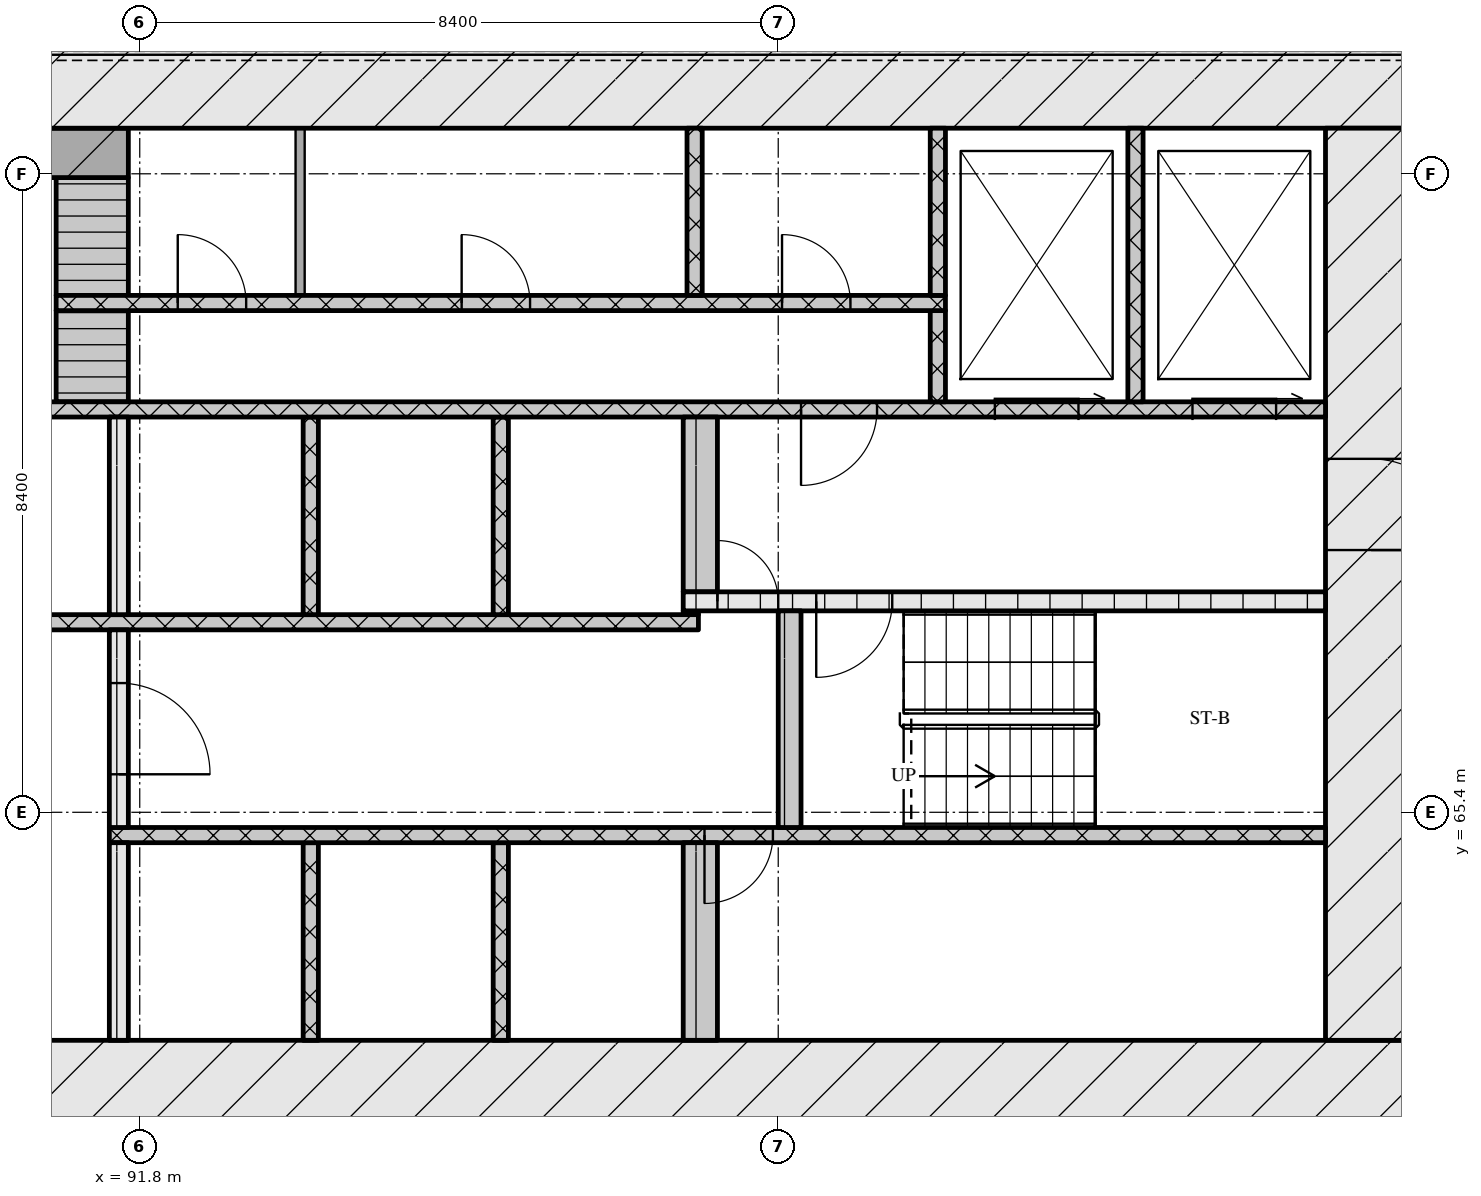
"""IFC4 building model, lengths in metres.
Left out: names, types, materials, properties, quantities, classifications, styles, units other than length and angle.
Written with IfcOpenShell. Run it as: python <this file> out.ifc"""

import sys

from ifc_helpers import new_model, si_unit, direction, frame, frame_2d, origin, place, context, subcontext, project, spatial, rectangle, extrude, element, fill, save


model = new_model("IFC4")
c1 = context("Model", 3, precision=1e-05, world=origin(), true_north=direction((0.0, 1.0)))
c2 = subcontext(c1, "Body", "Model", "MODEL_VIEW")
j1 = project(units=[si_unit("LENGTHUNIT", "METRE"), si_unit("PLANEANGLEUNIT", "RADIAN")], contexts=[c1])
p1 = place(None, origin())
s1 = spatial("IfcSite", under=j1, at=p1, CompositionType="ELEMENT")
p2 = place(p1, origin())
s2 = spatial("IfcBuilding", under=s1, at=p2, CompositionType="ELEMENT")
p3 = place(p2, frame((0.0, 0.0, 55.2)))
s3 = spatial("IfcBuildingStorey", under=s2, at=p3, CompositionType="ELEMENT", Elevation=55.2)
p4 = place(p3, frame((66.6, 61.8, 0.0), z_axis=(0.0, 0.0, 1.0), x_axis=(1.0, 0.0, 0.0)))
e1 = element("IfcWall", 1, at=p4, inside=s3, PredefinedType="SOLIDWALL", context=c2, shape_type="SweptSolid", body=[
    extrude(rectangle(XDim=42.0, YDim=1.2, at=frame_2d((21.0, 0.0))), origin(), (0.0, 0.0, 1.0), 3.32),
])
p5 = place(p4, frame((21.35, 0.0, 0.0)))
e2 = element("IfcOpeningElement", 2, at=p5, cuts=e1, PredefinedType="OPENING", context=c2, shape_type="SweptSolid", body=[
    extrude(rectangle(XDim=1.8, YDim=2.1, at=frame_2d((0.9, 1.05))), frame((0.0, 0.61, 0.0), z_axis=(0.0, -1.0, 0.0), x_axis=(1.0, 0.0, 0.0)), (0.0, 0.0, 1.0), 1.22),
])
p6 = place(p3, frame((66.6, 75.0, 0.0), z_axis=(0.0, 0.0, 1.0), x_axis=(1.0, 0.0, 0.0)))
e3 = element("IfcWall", 3, at=p6, inside=s3, PredefinedType="SOLIDWALL", context=c2, shape_type="SweptSolid", body=[
    extrude(rectangle(XDim=42.0, YDim=1.2, at=frame_2d((21.0, 0.0))), origin(), (0.0, 0.0, 1.0), 3.32),
])
p7 = place(p3, frame((108.0, 62.4, 0.0), z_axis=(0.0, 0.0, 1.0), x_axis=(0.0, 1.0, 0.0)))
e4 = element("IfcWall", 4, at=p7, inside=s3, PredefinedType="SOLIDWALL", context=c2, shape_type="SweptSolid", body=[
    extrude(rectangle(XDim=12.0, YDim=1.2, at=frame_2d((6.0, 0.0))), origin(), (0.0, 0.0, 1.0), 3.32),
])
p8 = place(p7, frame((6.45, 0.0, 0.0)))
e5 = element("IfcOpeningElement", 5, at=p8, cuts=e4, PredefinedType="OPENING", context=c2, shape_type="SweptSolid", body=[
    extrude(rectangle(XDim=1.2, YDim=2.1, at=frame_2d((0.6, 1.05))), frame((0.0, 0.61, 0.0), z_axis=(0.0, -1.0, 0.0), x_axis=(1.0, 0.0, 0.0)), (0.0, 0.0, 1.0), 1.22),
])
p9 = place(p3, frame((91.525, 62.4, 0.0), z_axis=(0.0, 0.0, 1.0), x_axis=(0.0, 1.0, 0.0)))
e6 = element("IfcWall", 6, at=p9, inside=s3, PredefinedType="SOLIDWALL", context=c2, shape_type="SweptSolid", body=[
    extrude(rectangle(XDim=2.6, YDim=0.25, at=frame_2d((1.3, 0.0))), origin(), (0.0, 0.0, 1.0), 3.32),
])
for number, where, z_axis, x_axis in (
    (7, (94.05, 62.4, 0.0), (0.0, 0.0, 1.0), (0.0, 1.0, 0.0)),
    (8, (96.55, 62.4, 0.0), (0.0, 0.0, 1.0), (0.0, 1.0, 0.0)),
):
    element("IfcWall", number, at=place(p3, frame(where, z_axis=z_axis, x_axis=x_axis)), inside=s3, PredefinedType="SOLIDWALL", context=c2, shape_type="SweptSolid", body=[
        extrude(rectangle(XDim=2.6, YDim=0.2, at=frame_2d((1.3, 0.0))), origin(), (0.0, 0.0, 1.0), 3.32),
    ])
p10 = place(p3, frame((99.175, 62.4, 0.0), z_axis=(0.0, 0.0, 1.0), x_axis=(0.0, 1.0, 0.0)))
e9 = element("IfcWall", 9, at=p10, inside=s3, PredefinedType="SOLIDWALL", context=c2, shape_type="SweptSolid", body=[
    extrude(rectangle(XDim=2.6, YDim=0.45, at=frame_2d((1.3, 0.0))), origin(), (0.0, 0.0, 1.0), 3.32),
])
p11 = place(p3, frame((91.4, 65.1, 0.0), z_axis=(0.0, 0.0, 1.0), x_axis=(1.0, 0.0, 0.0)))
e10 = element("IfcWall", 10, at=p11, inside=s3, PredefinedType="SOLIDWALL", context=c2, shape_type="SweptSolid", body=[
    extrude(rectangle(XDim=16.0, YDim=0.2, at=frame_2d((8.0, 0.0))), origin(), (0.0, 0.0, 1.0), 3.32),
])
p12 = place(p11, frame((7.83, 0.0, 0.0)))
e11 = element("IfcOpeningElement", 11, at=p12, cuts=e10, PredefinedType="OPENING", context=c2, shape_type="SweptSolid", body=[
    extrude(rectangle(XDim=0.9, YDim=2.1, at=frame_2d((0.45, 1.05))), frame((0.0, 0.11, 0.0), z_axis=(0.0, -1.0, 0.0), x_axis=(1.0, 0.0, 0.0)), (0.0, 0.0, 1.0), 0.22),
])
p13 = place(p3, frame((91.525, 65.2, 0.0), z_axis=(0.0, 0.0, 1.0), x_axis=(0.0, 1.0, 0.0)))
e12 = element("IfcWall", 12, at=p13, inside=s3, PredefinedType="SOLIDWALL", context=c2, shape_type="SweptSolid", body=[
    extrude(rectangle(XDim=2.6, YDim=0.25, at=frame_2d((1.3, 0.0))), origin(), (0.0, 0.0, 1.0), 3.32),
])
p14 = place(p13, frame((0.7, 0.0, 0.0)))
e13 = element("IfcOpeningElement", 13, at=p14, cuts=e12, PredefinedType="OPENING", context=c2, shape_type="SweptSolid", body=[
    extrude(rectangle(XDim=1.2, YDim=2.1, at=frame_2d((0.6, 1.05))), frame((0.0, 0.135, 0.0), z_axis=(0.0, -1.0, 0.0), x_axis=(1.0, 0.0, 0.0)), (0.0, 0.0, 1.0), 0.27),
])
p15 = place(p3, frame((100.35, 65.2, 0.0), z_axis=(0.0, 0.0, 1.0), x_axis=(0.0, 1.0, 0.0)))
e14 = element("IfcWall", 14, at=p15, inside=s3, PredefinedType="SOLIDWALL", context=c2, shape_type="SweptSolid", body=[
    extrude(rectangle(XDim=2.85, YDim=0.3, at=frame_2d((1.425, 0.0))), origin(), (0.0, 0.0, 1.0), 3.32),
])
p16 = place(p3, frame((76.05, 67.9, 0.0), z_axis=(0.0, 0.0, 1.0), x_axis=(1.0, 0.0, 0.0)))
e15 = element("IfcWall", 15, at=p16, inside=s3, PredefinedType="SOLIDWALL", context=c2, shape_type="SweptSolid", body=[
    extrude(rectangle(XDim=23.1, YDim=0.2, at=frame_2d((11.55, 0.0))), origin(), (0.0, 0.0, 1.0), 3.32),
])
p17 = place(p16, frame((0.6, 0.0, 0.0)))
e16 = element("IfcOpeningElement", 16, at=p17, cuts=e15, PredefinedType="OPENING", context=c2, shape_type="SweptSolid", body=[
    extrude(rectangle(XDim=1.1, YDim=2.1, at=frame_2d((0.55, 1.05))), frame((0.0, 0.11, 0.0), z_axis=(0.0, -1.0, 0.0), x_axis=(1.0, 0.0, 0.0)), (0.0, 0.0, 1.0), 0.22),
])
p18 = place(p16, frame((3.1, 0.0, 0.0)))
e17 = element("IfcOpeningElement", 17, at=p18, cuts=e15, PredefinedType="OPENING", context=c2, shape_type="SweptSolid", body=[
    extrude(rectangle(XDim=1.1, YDim=2.1, at=frame_2d((0.55, 1.05))), frame((0.0, 0.11, 0.0), z_axis=(0.0, -1.0, 0.0), x_axis=(1.0, 0.0, 0.0)), (0.0, 0.0, 1.0), 0.22),
])
p19 = place(p16, frame((5.6, 0.0, 0.0)))
e18 = element("IfcOpeningElement", 18, at=p19, cuts=e15, PredefinedType="OPENING", context=c2, shape_type="SweptSolid", body=[
    extrude(rectangle(XDim=1.1, YDim=2.1, at=frame_2d((0.55, 1.05))), frame((0.0, 0.11, 0.0), z_axis=(0.0, -1.0, 0.0), x_axis=(1.0, 0.0, 0.0)), (0.0, 0.0, 1.0), 0.22),
])
p20 = place(p16, frame((9.7, 0.0, 0.0)))
e19 = element("IfcOpeningElement", 19, at=p20, cuts=e15, PredefinedType="OPENING", context=c2, shape_type="SweptSolid", body=[
    extrude(rectangle(XDim=0.9, YDim=2.1, at=frame_2d((0.45, 1.05))), frame((0.0, 0.11, 0.0), z_axis=(0.0, -1.0, 0.0), x_axis=(1.0, 0.0, 0.0)), (0.0, 0.0, 1.0), 0.22),
])
p21 = place(p16, frame((13.55, 0.0, 0.0)))
e20 = element("IfcOpeningElement", 20, at=p21, cuts=e15, PredefinedType="OPENING", context=c2, shape_type="SweptSolid", body=[
    extrude(rectangle(XDim=1.0, YDim=2.1, at=frame_2d((0.5, 1.05))), frame((0.0, 0.11, 0.0), z_axis=(0.0, -1.0, 0.0), x_axis=(1.0, 0.0, 0.0)), (0.0, 0.0, 1.0), 0.22),
])
p22 = place(p3, frame((91.525, 68.0, 0.0), z_axis=(0.0, 0.0, 1.0), x_axis=(0.0, 1.0, 0.0)))
e21 = element("IfcWall", 21, at=p22, inside=s3, PredefinedType="SOLIDWALL", context=c2, shape_type="SweptSolid", body=[
    extrude(rectangle(XDim=2.6, YDim=0.25, at=frame_2d((1.3, 0.0))), origin(), (0.0, 0.0, 1.0), 3.32),
])
for number, where, z_axis, x_axis in (
    (22, (94.05, 68.0, 0.0), (0.0, 0.0, 1.0), (0.0, 1.0, 0.0)),
    (23, (96.55, 68.0, 0.0), (0.0, 0.0, 1.0), (0.0, 1.0, 0.0)),
):
    element("IfcWall", number, at=place(p3, frame(where, z_axis=z_axis, x_axis=x_axis)), inside=s3, PredefinedType="SOLIDWALL", context=c2, shape_type="SweptSolid", body=[
        extrude(rectangle(XDim=2.6, YDim=0.2, at=frame_2d((1.3, 0.0))), origin(), (0.0, 0.0, 1.0), 3.32),
    ])
p23 = place(p3, frame((98.95, 68.025, 0.0), z_axis=(0.0, 0.0, 1.0), x_axis=(1.0, 0.0, 0.0)))
e24 = element("IfcWall", 24, at=p23, inside=s3, PredefinedType="SOLIDWALL", context=c2, shape_type="SweptSolid", body=[
    extrude(rectangle(XDim=0.2, YDim=0.05, at=frame_2d((0.1, 0.0))), origin(), (0.0, 0.0, 1.0), 3.32),
])
p24 = place(p3, frame((98.95, 68.175, 0.0), z_axis=(0.0, 0.0, 1.0), x_axis=(1.0, 0.0, 0.0)))
e25 = element("IfcWall", 25, at=p24, inside=s3, PredefinedType="SOLIDWALL", context=c2, shape_type="SweptSolid", body=[
    extrude(rectangle(XDim=8.45, YDim=0.25, at=frame_2d((4.225, 0.0))), origin(), (0.0, 0.0, 1.0), 3.32),
])
p25 = place(p24, frame((0.45, 0.0, 0.0)))
e26 = element("IfcOpeningElement", 26, at=p25, cuts=e25, PredefinedType="OPENING", context=c2, shape_type="SweptSolid", body=[
    extrude(rectangle(XDim=0.8, YDim=2.1, at=frame_2d((0.4, 1.05))), frame((0.0, 0.135, 0.0), z_axis=(0.0, -1.0, 0.0), x_axis=(1.0, 0.0, 0.0)), (0.0, 0.0, 1.0), 0.27),
])
p26 = place(p24, frame((1.75, 0.0, 0.0)))
e27 = element("IfcOpeningElement", 27, at=p26, cuts=e25, PredefinedType="OPENING", context=c2, shape_type="SweptSolid", body=[
    extrude(rectangle(XDim=1.0, YDim=2.1, at=frame_2d((0.5, 1.05))), frame((0.0, 0.135, 0.0), z_axis=(0.0, -1.0, 0.0), x_axis=(1.0, 0.0, 0.0)), (0.0, 0.0, 1.0), 0.27),
])
p27 = place(p3, frame((99.175, 68.3, 0.0), z_axis=(0.0, 0.0, 1.0), x_axis=(0.0, 1.0, 0.0)))
e28 = element("IfcWall", 28, at=p27, inside=s3, PredefinedType="SOLIDWALL", context=c2, shape_type="SweptSolid", body=[
    extrude(rectangle(XDim=2.3, YDim=0.45, at=frame_2d((1.15, 0.0))), origin(), (0.0, 0.0, 1.0), 3.32),
])
p28 = place(p3, frame((67.8, 70.7, 0.0), z_axis=(0.0, 0.0, 1.0), x_axis=(1.0, 0.0, 0.0)))
e29 = element("IfcWall", 29, at=p28, inside=s3, PredefinedType="SOLIDWALL", context=c2, shape_type="SweptSolid", body=[
    extrude(rectangle(XDim=39.6, YDim=0.2, at=frame_2d((19.8, 0.0))), origin(), (0.0, 0.0, 1.0), 3.32),
])
p29 = place(p28, frame((0.65, 0.0, 0.0)))
e30 = element("IfcOpeningElement", 30, at=p29, cuts=e29, PredefinedType="OPENING", context=c2, shape_type="SweptSolid", body=[
    extrude(rectangle(XDim=1.1, YDim=2.1, at=frame_2d((0.55, 1.05))), frame((0.0, 0.11, 0.0), z_axis=(0.0, -1.0, 0.0), x_axis=(1.0, 0.0, 0.0)), (0.0, 0.0, 1.0), 0.22),
])
p30 = place(p28, frame((3.25, 0.0, 0.0)))
e31 = element("IfcOpeningElement", 31, at=p30, cuts=e29, PredefinedType="OPENING", context=c2, shape_type="SweptSolid", body=[
    extrude(rectangle(XDim=1.1, YDim=2.1, at=frame_2d((0.55, 1.05))), frame((0.0, 0.11, 0.0), z_axis=(0.0, -1.0, 0.0), x_axis=(1.0, 0.0, 0.0)), (0.0, 0.0, 1.0), 0.22),
])
p31 = place(p28, frame((5.9, 0.0, 0.0)))
e32 = element("IfcOpeningElement", 32, at=p31, cuts=e29, PredefinedType="OPENING", context=c2, shape_type="SweptSolid", body=[
    extrude(rectangle(XDim=1.0, YDim=2.1, at=frame_2d((0.5, 1.05))), frame((0.0, 0.11, 0.0), z_axis=(0.0, -1.0, 0.0), x_axis=(1.0, 0.0, 0.0)), (0.0, 0.0, 1.0), 0.22),
])
p32 = place(p28, frame((21.7, 0.0, 0.0)))
e33 = element("IfcOpeningElement", 33, at=p32, cuts=e29, PredefinedType="OPENING", context=c2, shape_type="SweptSolid", body=[
    extrude(rectangle(XDim=1.0, YDim=2.1, at=frame_2d((0.5, 1.05))), frame((0.0, 0.11, 0.0), z_axis=(0.0, -1.0, 0.0), x_axis=(1.0, 0.0, 0.0)), (0.0, 0.0, 1.0), 0.22),
])
p33 = place(p28, frame((32.7, 0.0, 0.0)))
e34 = element("IfcOpeningElement", 34, at=p33, cuts=e29, PredefinedType="OPENING", context=c2, shape_type="SweptSolid", body=[
    extrude(rectangle(XDim=1.0, YDim=2.1, at=frame_2d((0.5, 1.05))), frame((0.0, 0.11, 0.0), z_axis=(0.0, -1.0, 0.0), x_axis=(1.0, 0.0, 0.0)), (0.0, 0.0, 1.0), 0.22),
])
p34 = place(p28, frame((35.25, 0.0, 0.0)))
e35 = element("IfcOpeningElement", 35, at=p34, cuts=e29, PredefinedType="OPENING", context=c2, shape_type="SweptSolid", body=[
    extrude(rectangle(XDim=1.1, YDim=2.1, at=frame_2d((0.55, 1.05))), frame((0.0, 0.11, 0.0), z_axis=(0.0, -1.0, 0.0), x_axis=(1.0, 0.0, 0.0)), (0.0, 0.0, 1.0), 0.22),
])
p35 = place(p28, frame((37.85, 0.0, 0.0)))
e36 = element("IfcOpeningElement", 36, at=p35, cuts=e29, PredefinedType="OPENING", context=c2, shape_type="SweptSolid", body=[
    extrude(rectangle(XDim=1.1, YDim=2.1, at=frame_2d((0.55, 1.05))), frame((0.0, 0.11, 0.0), z_axis=(0.0, -1.0, 0.0), x_axis=(1.0, 0.0, 0.0)), (0.0, 0.0, 1.0), 0.22),
])
p36 = place(p3, frame((91.175, 70.8, 0.0), z_axis=(0.0, 0.0, 1.0), x_axis=(0.0, 1.0, 0.0)))
e37 = element("IfcWall", 37, at=p36, inside=s3, PredefinedType="SOLIDWALL", context=c2, shape_type="SweptSolid", body=[
    extrude(rectangle(XDim=1.2, YDim=0.95, at=frame_2d((0.6, 0.0))), origin(), (0.0, 0.0, 1.0), 3.32),
])
p37 = place(p3, frame((102.3, 70.8, 0.0), z_axis=(0.0, 0.0, 1.0), x_axis=(0.0, 1.0, 0.0)))
e38 = element("IfcWall", 38, at=p37, inside=s3, PredefinedType="SOLIDWALL", context=c2, shape_type="SweptSolid", body=[
    extrude(rectangle(XDim=1.2, YDim=0.2, at=frame_2d((0.6, 0.0))), origin(), (0.0, 0.0, 1.0), 3.32),
])
p38 = place(p3, frame((104.9, 70.8, 0.0), z_axis=(0.0, 0.0, 1.0), x_axis=(0.0, 1.0, 0.0)))
e39 = element("IfcWall", 39, at=p38, inside=s3, PredefinedType="SOLIDWALL", context=c2, shape_type="SweptSolid", body=[
    extrude(rectangle(XDim=3.6, YDim=0.2, at=frame_2d((1.8, 0.0))), origin(), (0.0, 0.0, 1.0), 3.32),
])
p39 = place(p3, frame((90.7, 72.1, 0.0), z_axis=(0.0, 0.0, 1.0), x_axis=(1.0, 0.0, 0.0)))
e40 = element("IfcWall", 40, at=p39, inside=s3, PredefinedType="SOLIDWALL", context=c2, shape_type="SweptSolid", body=[
    extrude(rectangle(XDim=11.7, YDim=0.2, at=frame_2d((5.85, 0.0))), origin(), (0.0, 0.0, 1.0), 3.32),
])
p40 = place(p39, frame((1.6, 0.0, 0.0)))
e41 = element("IfcOpeningElement", 41, at=p40, cuts=e40, PredefinedType="OPENING", context=c2, shape_type="SweptSolid", body=[
    extrude(rectangle(XDim=0.9, YDim=2.1, at=frame_2d((0.45, 1.05))), frame((0.0, 0.11, 0.0), z_axis=(0.0, -1.0, 0.0), x_axis=(1.0, 0.0, 0.0)), (0.0, 0.0, 1.0), 0.22),
])
p41 = place(p39, frame((5.335, 0.0, 0.0)))
e42 = element("IfcOpeningElement", 42, at=p41, cuts=e40, PredefinedType="OPENING", context=c2, shape_type="SweptSolid", body=[
    extrude(rectangle(XDim=0.9, YDim=2.1, at=frame_2d((0.45, 1.05))), frame((0.0, 0.11, 0.0), z_axis=(0.0, -1.0, 0.0), x_axis=(1.0, 0.0, 0.0)), (0.0, 0.0, 1.0), 0.22),
])
p42 = place(p39, frame((9.55, 0.0, 0.0)))
e43 = element("IfcOpeningElement", 43, at=p42, cuts=e40, PredefinedType="OPENING", context=c2, shape_type="SweptSolid", body=[
    extrude(rectangle(XDim=0.9, YDim=2.1, at=frame_2d((0.45, 1.05))), frame((0.0, 0.11, 0.0), z_axis=(0.0, -1.0, 0.0), x_axis=(1.0, 0.0, 0.0)), (0.0, 0.0, 1.0), 0.22),
])
p43 = place(p3, frame((91.175, 72.2, 0.0), z_axis=(0.0, 0.0, 1.0), x_axis=(0.0, 1.0, 0.0)))
e44 = element("IfcWall", 44, at=p43, inside=s3, PredefinedType="SOLIDWALL", context=c2, shape_type="SweptSolid", body=[
    extrude(rectangle(XDim=1.55, YDim=0.95, at=frame_2d((0.775, 0.0))), origin(), (0.0, 0.0, 1.0), 3.32),
])
p44 = place(p3, frame((93.91, 72.2, 0.0), z_axis=(0.0, 0.0, 1.0), x_axis=(0.0, 1.0, 0.0)))
e45 = element("IfcWall", 45, at=p44, inside=s3, PredefinedType="PARTITIONING", context=c2, shape_type="SweptSolid", body=[
    extrude(rectangle(XDim=2.2, YDim=0.12, at=frame_2d((1.1, 0.0))), origin(), (0.0, 0.0, 1.0), 3.32),
])
for number, where, z_axis, x_axis in (
    (46, (99.1, 72.2, 0.0), (0.0, 0.0, 1.0), (0.0, 1.0, 0.0)),
    (47, (102.3, 72.2, 0.0), (0.0, 0.0, 1.0), (0.0, 1.0, 0.0)),
):
    element("IfcWall", number, at=place(p3, frame(where, z_axis=z_axis, x_axis=x_axis)), inside=s3, PredefinedType="SOLIDWALL", context=c2, shape_type="SweptSolid", body=[
        extrude(rectangle(XDim=2.2, YDim=0.2, at=frame_2d((1.1, 0.0))), origin(), (0.0, 0.0, 1.0), 3.32),
    ])
p45 = place(p3, frame((83.55, 74.075, 0.0), z_axis=(0.0, 0.0, 1.0), x_axis=(1.0, 0.0, 0.0)))
e48 = element("IfcWall", 48, at=p45, inside=s3, PredefinedType="SOLIDWALL", context=c2, shape_type="SweptSolid", body=[
    extrude(rectangle(XDim=8.1, YDim=0.65, at=frame_2d((4.05, 0.0))), origin(), (0.0, 0.0, 1.0), 3.32),
])
p46 = place(p12, origin())
e49 = element("IfcDoor", 49, at=p46, inside=s3, OperationType="SINGLE_SWING_RIGHT", PredefinedType="DOOR", context=c2, shape_type="SweptSolid", body=[
    extrude(rectangle(XDim=0.9, YDim=2.1, at=frame_2d((0.45, 1.05))), frame((0.0, 0.025, 0.0), z_axis=(0.0, -1.0, 0.0), x_axis=(1.0, 0.0, 0.0)), (0.0, 0.0, 1.0), 0.05),
])
fill(e11, e49)
p47 = place(p14, origin())
e50 = element("IfcDoor", 50, at=p47, inside=s3, OperationType="SINGLE_SWING_RIGHT", PredefinedType="DOOR", context=c2, shape_type="SweptSolid", body=[
    extrude(rectangle(XDim=1.2, YDim=2.1, at=frame_2d((0.6, 1.05))), frame((0.0, 0.025, 0.0), z_axis=(0.0, -1.0, 0.0), x_axis=(1.0, 0.0, 0.0)), (0.0, 0.0, 1.0), 0.05),
])
fill(e13, e50)
p48 = place(p25, origin())
e51 = element("IfcDoor", 51, at=p48, inside=s3, OperationType="SINGLE_SWING_LEFT", PredefinedType="DOOR", context=c2, shape_type="SweptSolid", body=[
    extrude(rectangle(XDim=0.8, YDim=2.1, at=frame_2d((0.4, 1.05))), frame((0.0, 0.025, 0.0), z_axis=(0.0, -1.0, 0.0), x_axis=(1.0, 0.0, 0.0)), (0.0, 0.0, 1.0), 0.05),
])
fill(e26, e51)
p49 = place(p26, origin())
e52 = element("IfcDoor", 52, at=p49, inside=s3, OperationType="SINGLE_SWING_RIGHT", PredefinedType="DOOR", context=c2, shape_type="SweptSolid", body=[
    extrude(rectangle(XDim=1.0, YDim=2.1, at=frame_2d((0.5, 1.05))), frame((0.0, 0.025, 0.0), z_axis=(0.0, -1.0, 0.0), x_axis=(1.0, 0.0, 0.0)), (0.0, 0.0, 1.0), 0.05),
])
fill(e27, e52)
p50 = place(p8, origin())
e53 = element("IfcDoor", 53, at=p50, inside=s3, OperationType="SINGLE_SWING_RIGHT", PredefinedType="DOOR", context=c2, shape_type="SweptSolid", body=[
    extrude(rectangle(XDim=1.2, YDim=2.1, at=frame_2d((0.6, 1.05))), frame((0.0, 0.025, 0.0), z_axis=(0.0, -1.0, 0.0), x_axis=(1.0, 0.0, 0.0)), (0.0, 0.0, 1.0), 0.05),
])
fill(e5, e53)
p51 = place(p33, origin())
e54 = element("IfcDoor", 54, at=p51, inside=s3, OperationType="SINGLE_SWING_RIGHT", PredefinedType="DOOR", context=c2, shape_type="SweptSolid", body=[
    extrude(rectangle(XDim=1.0, YDim=2.1, at=frame_2d((0.5, 1.05))), frame((0.0, 0.025, 0.0), z_axis=(0.0, -1.0, 0.0), x_axis=(1.0, 0.0, 0.0)), (0.0, 0.0, 1.0), 0.05),
])
fill(e34, e54)
p52 = place(p34, origin())
e55 = element("IfcDoor", 55, at=p52, inside=s3, OperationType="SLIDING_TO_RIGHT", PredefinedType="DOOR", context=c2, shape_type="SweptSolid", body=[
    extrude(rectangle(XDim=1.1, YDim=2.1, at=frame_2d((0.55, 1.05))), frame((0.0, 0.025, 0.0), z_axis=(0.0, -1.0, 0.0), x_axis=(1.0, 0.0, 0.0)), (0.0, 0.0, 1.0), 0.05),
])
fill(e35, e55)
p53 = place(p35, origin())
e56 = element("IfcDoor", 56, at=p53, inside=s3, OperationType="SLIDING_TO_RIGHT", PredefinedType="DOOR", context=c2, shape_type="SweptSolid", body=[
    extrude(rectangle(XDim=1.1, YDim=2.1, at=frame_2d((0.55, 1.05))), frame((0.0, 0.025, 0.0), z_axis=(0.0, -1.0, 0.0), x_axis=(1.0, 0.0, 0.0)), (0.0, 0.0, 1.0), 0.05),
])
fill(e36, e56)
p54 = place(p40, origin())
e57 = element("IfcDoor", 57, at=p54, inside=s3, OperationType="SINGLE_SWING_LEFT", PredefinedType="DOOR", context=c2, shape_type="SweptSolid", body=[
    extrude(rectangle(XDim=0.9, YDim=2.1, at=frame_2d((0.45, 1.05))), frame((0.0, 0.025, 0.0), z_axis=(0.0, -1.0, 0.0), x_axis=(1.0, 0.0, 0.0)), (0.0, 0.0, 1.0), 0.05),
])
fill(e41, e57)
p55 = place(p41, origin())
e58 = element("IfcDoor", 58, at=p55, inside=s3, OperationType="SINGLE_SWING_LEFT", PredefinedType="DOOR", context=c2, shape_type="SweptSolid", body=[
    extrude(rectangle(XDim=0.9, YDim=2.1, at=frame_2d((0.45, 1.05))), frame((0.0, 0.025, 0.0), z_axis=(0.0, -1.0, 0.0), x_axis=(1.0, 0.0, 0.0)), (0.0, 0.0, 1.0), 0.05),
])
fill(e42, e58)
p56 = place(p42, origin())
e59 = element("IfcDoor", 59, at=p56, inside=s3, OperationType="SINGLE_SWING_LEFT", PredefinedType="DOOR", context=c2, shape_type="SweptSolid", body=[
    extrude(rectangle(XDim=0.9, YDim=2.1, at=frame_2d((0.45, 1.05))), frame((0.0, 0.025, 0.0), z_axis=(0.0, -1.0, 0.0), x_axis=(1.0, 0.0, 0.0)), (0.0, 0.0, 1.0), 0.05),
])
fill(e43, e59)
save(model, sys.argv[1])
